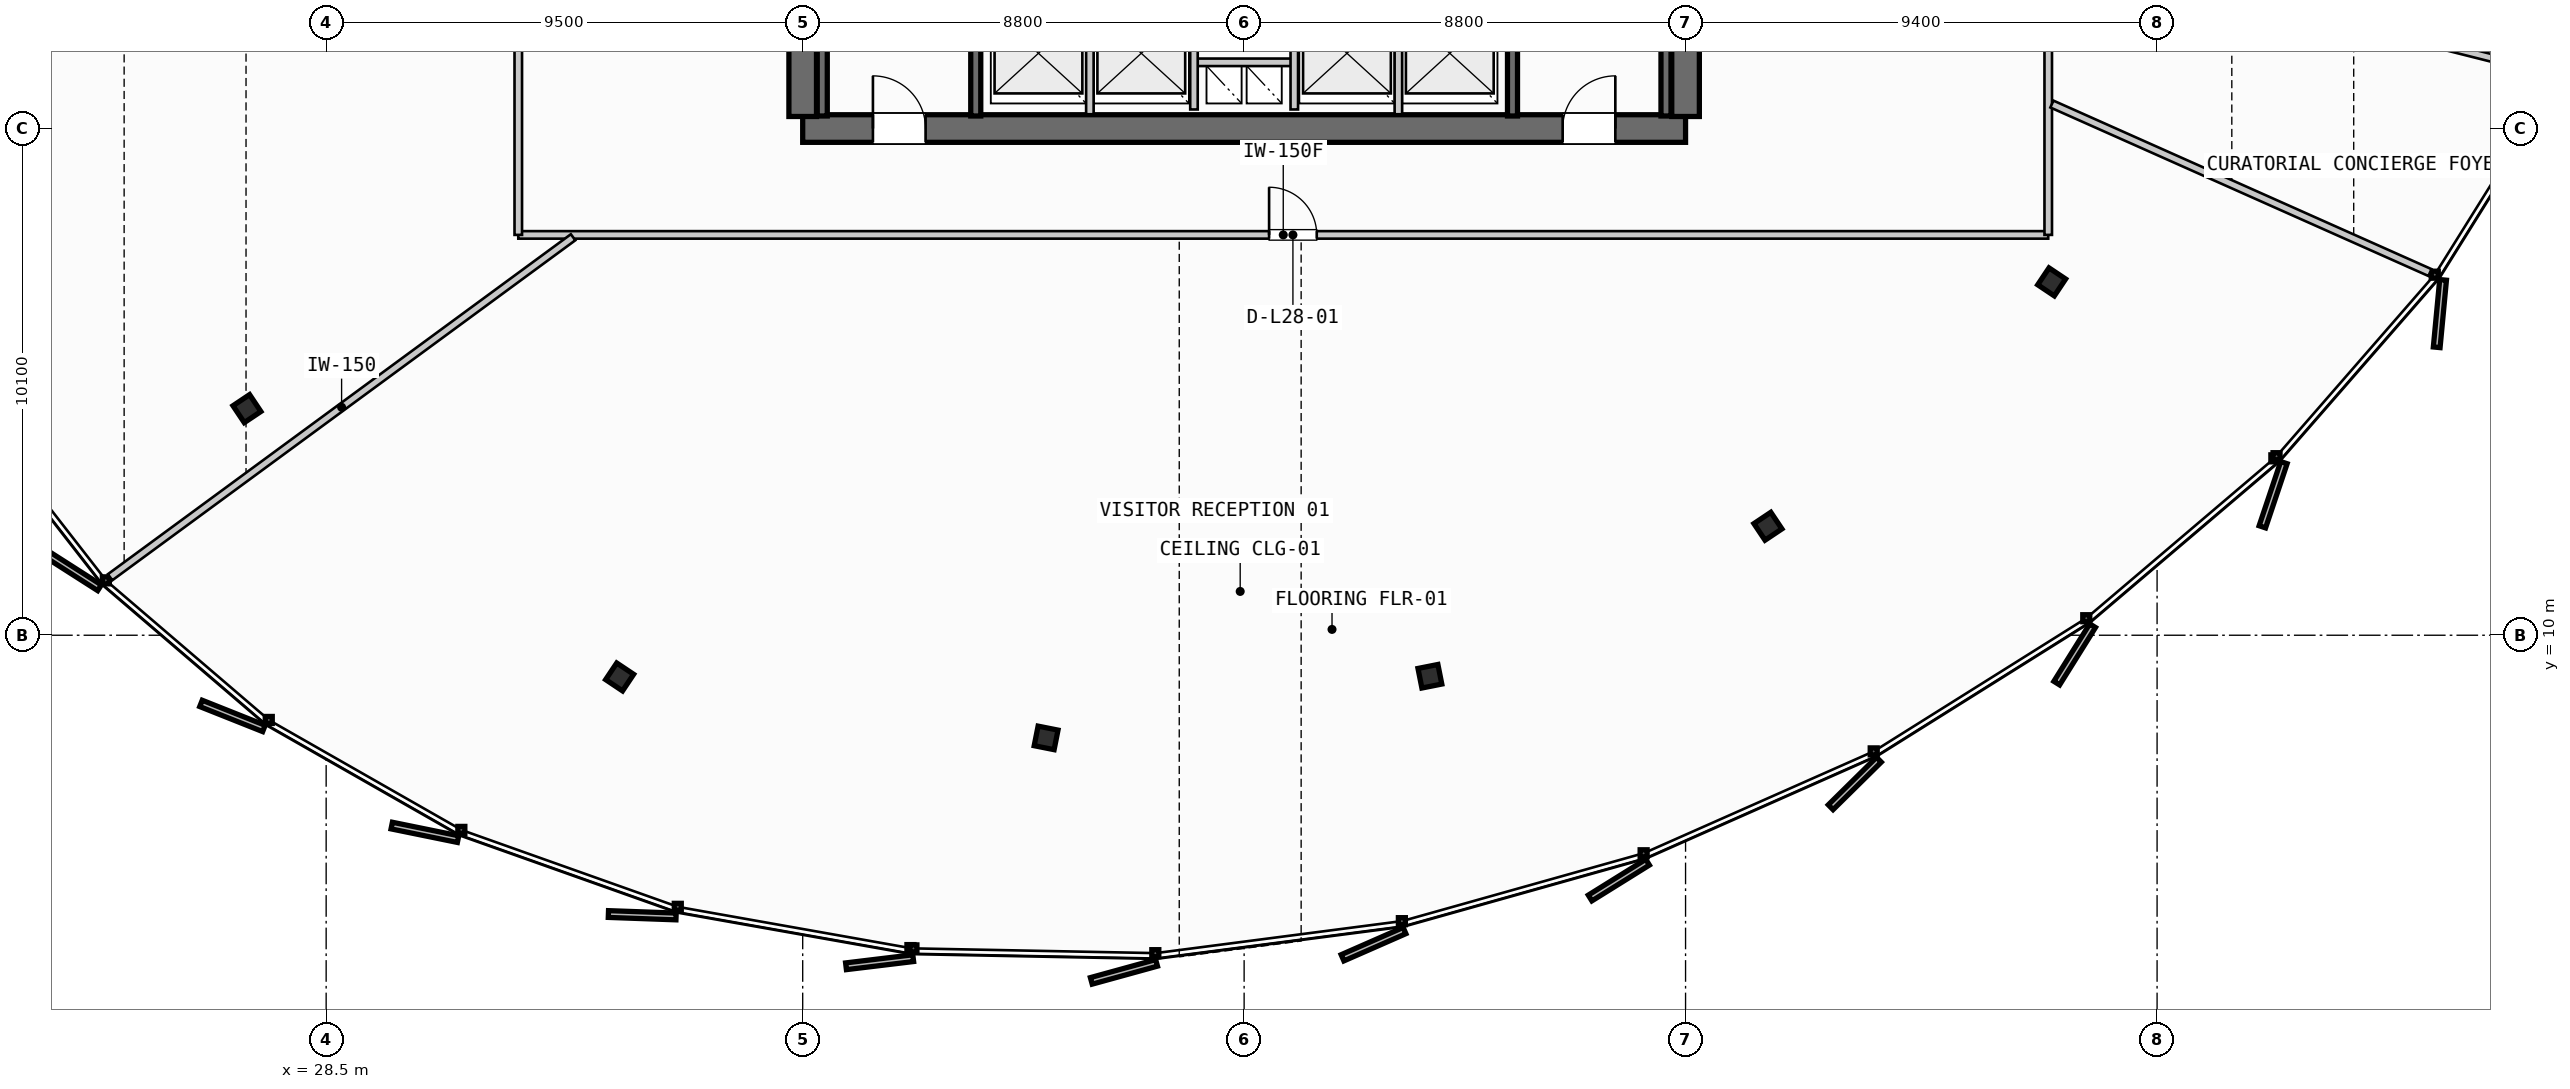
"""IFC4 building model, lengths in metres.
Left out: names, types, materials, properties, quantities, classifications, styles, units other than length and angle.
Written with IfcOpenShell. Run it as: python <this file> out.ifc"""

import sys

from ifc_helpers import new_model, si_unit, direction, frame, frame_2d, origin, origin_2d, place, context, subcontext, project, spatial, rectangle, i_section, extrude, source, transform, mapped, element, fill, save


model = new_model("IFC4")
c1 = context("Model", 3, precision=1e-05, world=origin(), true_north=direction((0.0, 1.0)))
c2 = subcontext(c1, "Body", "Model", "MODEL_VIEW")
j1 = project(units=[si_unit("LENGTHUNIT", "METRE"), si_unit("PLANEANGLEUNIT", "RADIAN")], contexts=[c1])
p1 = place(None, origin())
s1 = spatial("IfcSite", under=j1, at=p1, CompositionType="ELEMENT")
p2 = place(p1, origin())
s2 = spatial("IfcBuilding", under=s1, at=p2, CompositionType="ELEMENT")
p3 = place(p2, frame((0.0, 0.0, 114.4)))
s3 = spatial("IfcBuildingStorey", under=s2, at=p3, CompositionType="ELEMENT", Elevation=114.4)
p4 = place(p3, frame((38.0, 20.1, 0.0), z_axis=(0.0, 0.0, 1.0), x_axis=(1.0, 0.0, 0.0)))
e1 = element("IfcWall", 1, at=p4, inside=s3, PredefinedType="SHEAR", context=c2, shape_type="SweptSolid", body=[
    extrude(rectangle(XDim=17.6, YDim=0.55, at=frame_2d((8.8, 0.0))), origin(), (0.0, 0.0, 1.0), 3.35),
])
p5 = place(p4, frame((1.4, 0.0, 0.0)))
e2 = element("IfcOpeningElement", 2, at=p5, cuts=e1, PredefinedType="OPENING", context=c2, shape_type="SweptSolid", body=[
    extrude(rectangle(XDim=1.05, YDim=2.15, at=frame_2d((0.525, 1.075))), frame((0.0, 0.285, 0.0), z_axis=(0.0, -1.0, 0.0), x_axis=(1.0, 0.0, 0.0)), (0.0, 0.0, 1.0), 0.57),
])
p6 = place(p4, frame((15.15, 0.0, 0.0)))
e3 = element("IfcOpeningElement", 3, at=p6, cuts=e1, PredefinedType="OPENING", context=c2, shape_type="SweptSolid", body=[
    extrude(rectangle(XDim=1.05, YDim=2.15, at=frame_2d((0.525, 1.075))), frame((0.0, 0.285, 0.0), z_axis=(0.0, -1.0, 0.0), x_axis=(1.0, 0.0, 0.0)), (0.0, 0.0, 1.0), 0.57),
])
p7 = place(p3, frame((38.0, 35.26, 0.0), z_axis=(0.0, 0.0, 1.0), x_axis=(0.0, -1.0, 0.0)))
e4 = element("IfcWall", 4, at=p7, inside=s3, PredefinedType="SHEAR", context=c2, shape_type="SweptSolid", body=[
    extrude(rectangle(XDim=14.92, YDim=0.55, at=frame_2d((7.46, 0.0))), origin(), (0.0, 0.0, 1.0), 3.35),
])
p8 = place(p7, frame((5.21, 0.0, 0.0)))
e5 = element("IfcOpeningElement", 5, at=p8, cuts=e4, PredefinedType="OPENING", context=c2, shape_type="SweptSolid", body=[
    extrude(rectangle(XDim=1.1, YDim=2.2, at=frame_2d((0.55, 1.1))), frame((0.0, 0.285, 0.0), z_axis=(0.0, -1.0, 0.0), x_axis=(1.0, 0.0, 0.0)), (0.0, 0.0, 1.0), 0.57),
])
p9 = place(p3, frame((55.6, 20.34, 0.0), z_axis=(0.0, 0.0, 1.0), x_axis=(0.0, 1.0, 0.0)))
e6 = element("IfcWall", 6, at=p9, inside=s3, PredefinedType="SHEAR", context=c2, shape_type="SweptSolid", body=[
    extrude(rectangle(XDim=14.92, YDim=0.55, at=frame_2d((7.46, 0.0))), origin(), (0.0, 0.0, 1.0), 3.35),
])
p10 = place(p9, frame((12.71, 0.0, 0.0)))
e7 = element("IfcOpeningElement", 7, at=p10, cuts=e6, PredefinedType="OPENING", context=c2, shape_type="SweptSolid", body=[
    extrude(rectangle(XDim=1.05, YDim=2.15, at=frame_2d((0.525, 1.075))), frame((0.0, 0.285, 0.0), z_axis=(0.0, -1.0, 0.0), x_axis=(1.0, 0.0, 0.0)), (0.0, 0.0, 1.0), 0.57),
])
p11 = place(p9, frame((8.61, 0.0, 0.0)))
e8 = element("IfcOpeningElement", 8, at=p11, cuts=e6, PredefinedType="OPENING", context=c2, shape_type="SweptSolid", body=[
    extrude(rectangle(XDim=1.1, YDim=2.2, at=frame_2d((0.55, 1.1))), frame((0.0, 0.285, 0.0), z_axis=(0.0, -1.0, 0.0), x_axis=(1.0, 0.0, 0.0)), (0.0, 0.0, 1.0), 0.57),
])
m1 = source(origin(), c2, "Body", "SweptSolid", [
    extrude(i_section(OverallWidth=0.405, OverallDepth=0.398, WebThickness=0.035, FlangeThickness=0.056, FilletRadius=0.015, at=origin_2d()), origin(), (0.0, 0.0, 1.0), 3.35),
])
for number, where, z_axis, x_axis in (
    (9, (26.921, 14.517, 0.0), (0.0, 0.0, 1.0), (-0.831, -0.556, 0.0)),
    (10, (34.351, 9.168, 0.0), (0.0, 0.0, 1.0), (-0.556, -0.831, 0.0)),
    (11, (42.852, 7.954, 0.0), (0.0, 0.0, 1.0), (-0.195, -0.981, 0.0)),
    (12, (50.503, 9.182, 0.0), (0.0, 0.0, 1.0), (0.195, -0.981, 0.0)),
    (13, (57.242, 12.172, 0.0), (0.0, 0.0, 1.0), (0.556, -0.831, 0.0)),
    (14, (62.899, 17.043, 0.0), (0.0, 0.0, 1.0), (0.831, -0.556, 0.0)),
):
    element("IfcColumn", number, at=place(p3, frame(where, z_axis=z_axis, x_axis=x_axis)), inside=s3, PredefinedType="COLUMN", context=c2, shape_type="MappedRepresentation", body=[
        mapped(m1, transform((0.0, 0.0, 0.0), scale=1.0)),
    ])
for number, where, z_axis, x_axis in (
    (15, (41.45, 27.7, 0.0), (0.0, 0.0, 1.0), (0.0, -1.0, 0.0)),
    (16, (38.39, 20.35, 0.0), (0.0, 0.0, 1.0), (0.0, 1.0, 0.0)),
    (17, (55.21, 27.7, 0.0), (0.0, 0.0, 1.0), (0.0, -1.0, 0.0)),
    (18, (52.15, 20.35, 0.0), (0.0, 0.0, 1.0), (0.0, 1.0, 0.0)),
):
    element("IfcWall", number, at=place(p3, frame(where, z_axis=z_axis, x_axis=x_axis)), inside=s3, PredefinedType="SHEAR", context=c2, shape_type="SweptSolid", body=[
        extrude(rectangle(XDim=7.35, YDim=0.2, at=frame_2d((3.675, 0.0))), origin(), (0.0, 0.0, 1.0), 3.35),
    ])
p12 = place(p3, frame((45.8, 21.42, 0.0), z_axis=(0.0, 0.0, 1.0), x_axis=(1.0, 0.0, 0.0)))
e19 = element("IfcWall", 19, at=p12, inside=s3, PredefinedType="PARTITIONING", context=c2, shape_type="SweptSolid", body=[
    extrude(rectangle(XDim=2.0, YDim=0.15, at=frame_2d((1.0, 0.0))), origin(), (0.0, 0.0, 1.0), 2.28),
])
for number, where, z_axis, x_axis in (
    (20, (45.8, 20.48, 0.0), (0.0, 0.0, 1.0), (0.0, 1.0, 0.0)),
    (21, (47.8, 20.48, 0.0), (0.0, 0.0, 1.0), (0.0, 1.0, 0.0)),
):
    element("IfcWall", number, at=place(p3, frame(where, z_axis=z_axis, x_axis=x_axis)), inside=s3, PredefinedType="PARTITIONING", context=c2, shape_type="SweptSolid", body=[
        extrude(rectangle(XDim=2.24, YDim=0.15, at=frame_2d((1.12, 0.0))), origin(), (0.0, 0.0, 1.0), 2.28),
    ])
for number, where, z_axis, x_axis in (
    (22, (43.725, 20.385, 0.0), (0.0, 0.0, 1.0), (0.0, 1.0, 0.0)),
    (23, (49.875, 20.385, 0.0), (0.0, 0.0, 1.0), (0.0, 1.0, 0.0)),
):
    element("IfcWall", number, at=place(p3, frame(where, z_axis=z_axis, x_axis=x_axis)), inside=s3, PredefinedType="PARTITIONING", context=c2, shape_type="SweptSolid", body=[
        extrude(rectangle(XDim=2.345, YDim=0.15, at=frame_2d((1.172, 0.0))), origin(), (0.0, 0.0, 1.0), 2.28),
    ])
p13 = place(p3, frame((32.33, 17.98, 0.0), z_axis=(0.0, 0.0, 1.0), x_axis=(1.0, 0.0, 0.0)))
e24 = element("IfcWall", 24, at=p13, inside=s3, PredefinedType="PARTITIONING", context=c2, shape_type="SweptSolid", body=[
    extrude(rectangle(XDim=30.5, YDim=0.15, at=frame_2d((15.25, 0.0))), origin(), (0.0, 0.0, 1.0), 2.28),
])
p14 = place(p13, frame((14.968, 0.0, 0.0)))
e25 = element("IfcOpeningElement", 25, at=p14, cuts=e24, PredefinedType="OPENING", context=c2, shape_type="SweptSolid", body=[
    extrude(rectangle(XDim=0.95, YDim=2.15, at=frame_2d((0.475, 1.075))), frame((0.0, 0.085, 0.0), z_axis=(0.0, -1.0, 0.0), x_axis=(1.0, 0.0, 0.0)), (0.0, 0.0, 1.0), 0.17),
])
p15 = place(p3, frame((62.83, 17.98, 0.0), z_axis=(0.0, 0.0, 1.0), x_axis=(0.0, 1.0, 0.0)))
e26 = element("IfcWall", 26, at=p15, inside=s3, PredefinedType="PARTITIONING", context=c2, shape_type="SweptSolid", body=[
    extrude(rectangle(XDim=19.22, YDim=0.15, at=frame_2d((9.61, 0.0))), origin(), (0.0, 0.0, 1.0), 2.28),
])
p16 = place(p15, frame((3.709, 0.0, 0.0)))
e27 = element("IfcOpeningElement", 27, at=p16, cuts=e26, PredefinedType="OPENING", context=c2, shape_type="SweptSolid", body=[
    extrude(rectangle(XDim=0.95, YDim=2.15, at=frame_2d((0.475, 1.075))), frame((0.0, 0.085, 0.0), z_axis=(0.0, -1.0, 0.0), x_axis=(1.0, 0.0, 0.0)), (0.0, 0.0, 1.0), 0.17),
])
p17 = place(p15, frame((11.554, 0.0, 0.0)))
e28 = element("IfcOpeningElement", 28, at=p17, cuts=e26, PredefinedType="OPENING", context=c2, shape_type="SweptSolid", body=[
    extrude(rectangle(XDim=0.95, YDim=2.15, at=frame_2d((0.475, 1.075))), frame((0.0, 0.085, 0.0), z_axis=(0.0, -1.0, 0.0), x_axis=(1.0, 0.0, 0.0)), (0.0, 0.0, 1.0), 0.17),
])
p18 = place(p3, frame((32.33, 37.2, 0.0), z_axis=(0.0, 0.0, 1.0), x_axis=(0.0, -1.0, 0.0)))
e29 = element("IfcWall", 29, at=p18, inside=s3, PredefinedType="PARTITIONING", context=c2, shape_type="SweptSolid", body=[
    extrude(rectangle(XDim=19.22, YDim=0.15, at=frame_2d((9.61, 0.0))), origin(), (0.0, 0.0, 1.0), 2.28),
])
p19 = place(p18, frame((10.229, 0.0, 0.0)))
e30 = element("IfcOpeningElement", 30, at=p19, cuts=e29, PredefinedType="OPENING", context=c2, shape_type="SweptSolid", body=[
    extrude(rectangle(XDim=0.95, YDim=2.15, at=frame_2d((0.475, 1.075))), frame((0.0, 0.085, 0.0), z_axis=(0.0, -1.0, 0.0), x_axis=(1.0, 0.0, 0.0)), (0.0, 0.0, 1.0), 0.17),
])
p20 = place(p3, frame((33.423, 17.933, 0.0), z_axis=(0.0, 0.0, 1.0), x_axis=(-0.806068638556, -0.591822059353, 0.0)))
e31 = element("IfcWall", 31, at=p20, inside=s3, PredefinedType="PARTITIONING", context=c2, shape_type="SweptSolid", body=[
    extrude(rectangle(XDim=11.45, YDim=0.15, at=frame_2d((5.725, 0.0))), origin(), (0.0, 0.0, 1.0), 2.28),
])
p21 = place(p3, frame((62.903, 20.588, 0.0), z_axis=(0.0, 0.0, 1.0), x_axis=(0.91339868134, -0.407066148096, 0.0)))
e32 = element("IfcWall", 32, at=p21, inside=s3, PredefinedType="PARTITIONING", context=c2, shape_type="SweptSolid", body=[
    extrude(rectangle(XDim=8.251, YDim=0.15, at=frame_2d((4.126, 0.0))), origin(), (0.0, 0.0, 1.0), 2.28),
])
p22 = place(p3, frame((62.908, 23.715, 0.0), z_axis=(0.0, 0.0, 1.0), x_axis=(0.969678992697, -0.244382182496, 0.0)))
e33 = element("IfcWall", 33, at=p22, inside=s3, PredefinedType="PARTITIONING", context=c2, shape_type="SweptSolid", body=[
    extrude(rectangle(XDim=10.326, YDim=0.15, at=frame_2d((5.163, 0.0))), origin(), (0.0, 0.0, 1.0), 2.28),
])
m2 = source(origin(), c2, "Body", "SweptSolid", [
    extrude(rectangle(XDim=1.05, YDim=2.15, at=frame_2d((0.525, 1.075))), frame((0.0, 0.025, 0.0), z_axis=(0.0, -1.0, 0.0), x_axis=(1.0, 0.0, 0.0)), (0.0, 0.0, 1.0), 0.05),
])
p23 = place(p5, origin())
e34 = element("IfcDoor", 34, at=p23, inside=s3, OperationType="SINGLE_SWING_LEFT", PredefinedType="DOOR", context=c2, shape_type="MappedRepresentation", body=[
    mapped(m2, transform((0.0, 0.0, 0.0), scale=1.0)),
])
fill(e2, e34)
p24 = place(p6, origin())
e35 = element("IfcDoor", 35, at=p24, inside=s3, OperationType="SINGLE_SWING_RIGHT", PredefinedType="DOOR", context=c2, shape_type="MappedRepresentation", body=[
    mapped(m2, transform((0.0, 0.0, 0.0), scale=1.0)),
])
fill(e3, e35)
m3 = source(origin(), c2, "Body", "SweptSolid", [
    extrude(rectangle(XDim=0.95, YDim=2.15, at=frame_2d((0.475, 1.075))), frame((0.0, 0.025, 0.0), z_axis=(0.0, -1.0, 0.0), x_axis=(1.0, 0.0, 0.0)), (0.0, 0.0, 1.0), 0.05),
])
p25 = place(p14, origin())
e36 = element("IfcDoor", 36, at=p25, inside=s3, OperationType="SINGLE_SWING_LEFT", PredefinedType="DOOR", context=c2, shape_type="MappedRepresentation", body=[
    mapped(m3, transform((0.0, 0.0, 0.0), scale=1.0)),
])
fill(e25, e36)
save(model, sys.argv[1])
